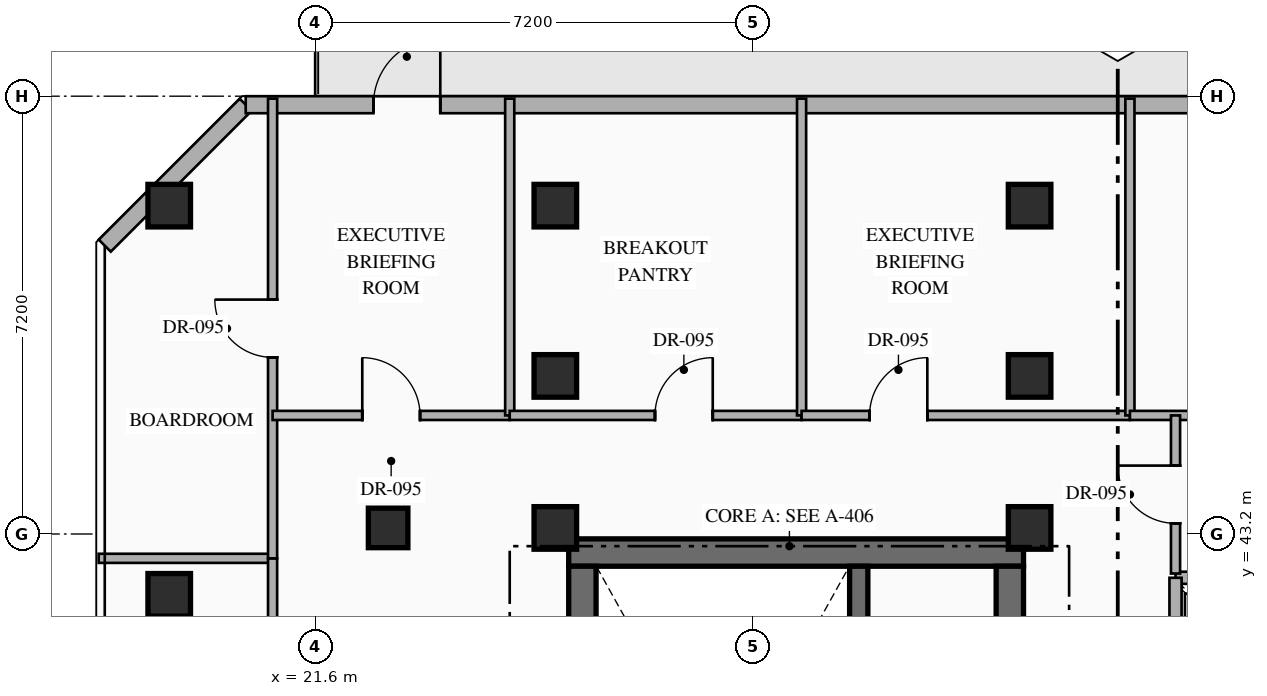
"""IFC4 building model, lengths in metres.
Left out: names, types, materials, properties, quantities, classifications, styles, units other than length and angle.
Written with IfcOpenShell. Run it as: python <this file> out.ifc"""

import sys

from ifc_helpers import new_model, si_unit, direction, frame, frame_2d, origin, origin_2d, place, context, subcontext, project, spatial, rectangle, hollow_rectangle, extrude, element, fill, save


model = new_model("IFC4")
c1 = context("Model", 3, precision=1e-05, world=origin(), true_north=direction((0.0, 1.0)))
c2 = subcontext(c1, "Body", "Model", "MODEL_VIEW")
j1 = project(units=[si_unit("LENGTHUNIT", "METRE"), si_unit("PLANEANGLEUNIT", "RADIAN")], contexts=[c1])
p1 = place(None, origin())
s1 = spatial("IfcSite", under=j1, at=p1, CompositionType="ELEMENT")
p2 = place(p1, origin())
s2 = spatial("IfcBuilding", under=s1, at=p2, CompositionType="ELEMENT")
p3 = place(p2, frame((0.0, 0.0, 223.95)))
s3 = spatial("IfcBuildingStorey", under=s2, at=p3, CompositionType="ELEMENT", Elevation=223.95)
p4 = place(p3, frame((25.77, 42.895, 0.0), z_axis=(0.0, 0.0, 1.0), x_axis=(1.0, 0.0, 0.0)))
e1 = element("IfcWall", 1, at=p4, inside=s3, PredefinedType="SHEAR", context=c2, shape_type="SweptSolid", body=[
    extrude(rectangle(XDim=7.48, YDim=0.45, at=frame_2d((3.74, 0.0))), origin(), (0.0, 0.0, 1.0), 3.6),
])
p5 = place(p3, frame((25.995, 33.19, 0.0), z_axis=(0.0, 0.0, 1.0), x_axis=(0.0, 1.0, 0.0)))
e2 = element("IfcWall", 2, at=p5, inside=s3, PredefinedType="SHEAR", context=c2, shape_type="SweptSolid", body=[
    extrude(rectangle(XDim=9.48, YDim=0.45, at=frame_2d((4.74, 0.0))), origin(), (0.0, 0.0, 1.0), 3.6),
])
p6 = place(p3, frame((33.025, 33.19, 0.0), z_axis=(0.0, 0.0, 1.0), x_axis=(0.0, 1.0, 0.0)))
e3 = element("IfcWall", 3, at=p6, inside=s3, PredefinedType="SHEAR", context=c2, shape_type="SweptSolid", body=[
    extrude(rectangle(XDim=9.48, YDim=0.45, at=frame_2d((4.74, 0.0))), origin(), (0.0, 0.0, 1.0), 3.6),
])
p7 = place(p6, frame((4.16, 0.0, 0.0)))
e4 = element("IfcOpeningElement", 4, at=p7, cuts=e3, PredefinedType="OPENING", context=c2, shape_type="SweptSolid", body=[
    extrude(rectangle(XDim=0.85, YDim=2.08, at=frame_2d((0.425, 1.04))), frame((0.0, 0.235, 0.0), z_axis=(0.0, -1.0, 0.0), x_axis=(1.0, 0.0, 0.0)), (0.0, 0.0, 1.0), 0.47),
])
p8 = place(p6, frame((7.36, 0.0, 0.0)))
e5 = element("IfcOpeningElement", 5, at=p8, cuts=e3, PredefinedType="OPENING", context=c2, shape_type="SweptSolid", body=[
    extrude(rectangle(XDim=0.85, YDim=2.08, at=frame_2d((0.425, 1.04))), frame((0.0, 0.235, 0.0), z_axis=(0.0, -1.0, 0.0), x_axis=(1.0, 0.0, 0.0)), (0.0, 0.0, 1.0), 0.47),
])
p9 = place(p3, frame((30.54, 33.19, 0.0), z_axis=(0.0, 0.0, 1.0), x_axis=(0.0, 1.0, 0.0)))
e6 = element("IfcWall", 6, at=p9, inside=s3, PredefinedType="SHEAR", context=c2, shape_type="SweptSolid", body=[
    extrude(rectangle(XDim=9.48, YDim=0.3, at=frame_2d((4.74, 0.0))), origin(), (0.0, 0.0, 1.0), 3.6),
])
for number, where, z_axis, x_axis in (
    (7, (25.55, 43.3, 0.0), (0.0, 0.0, 1.0), (1.0, 0.0, 0.0)),
    (8, (33.35, 43.3, 0.0), (0.0, 0.0, 1.0), (1.0, 0.0, 0.0)),
    (9, (25.55, 45.8, 0.0), (0.0, 0.0, 1.0), (1.0, 0.0, 0.0)),
    (10, (33.35, 45.8, 0.0), (0.0, 0.0, 1.0), (1.0, 0.0, 0.0)),
    (11, (19.2, 48.6, 0.0), (0.0, 0.0, 1.0), (1.0, 0.0, 0.0)),
    (12, (25.55, 48.6, 0.0), (0.0, 0.0, 1.0), (1.0, 0.0, 0.0)),
    (13, (33.35, 48.6, 0.0), (0.0, 0.0, 1.0), (1.0, 0.0, 0.0)),
    (14, (19.2, 42.2, 0.0), (0.0, 0.0, 1.0), (1.0, 0.0, 0.0)),
):
    element("IfcColumn", number, at=place(p3, frame(where, z_axis=z_axis, x_axis=x_axis)), inside=s3, PredefinedType="COLUMN", context=c2, shape_type="SweptSolid", body=[
        extrude(hollow_rectangle(XDim=0.7, YDim=0.7, WallThickness=0.028, at=origin_2d()), origin(), (0.0, 0.0, 1.0), 3.6),
    ])
p10 = place(p3, frame((22.8, 43.3, 0.0), z_axis=(0.0, 0.0, 1.0), x_axis=(1.0, 0.0, 0.0)))
e15 = element("IfcColumn", 15, at=p10, inside=s3, PredefinedType="COLUMN", context=c2, shape_type="SweptSolid", body=[
    extrude(hollow_rectangle(XDim=0.65, YDim=0.65, WallThickness=0.025, at=origin_2d()), origin(), (0.0, 0.0, 1.0), 3.6),
])
p11 = place(p3, frame((18.14, 47.942, 0.0), z_axis=(0.0, 0.0, 1.0), x_axis=(0.707106781187, 0.707106781187, 0.0)))
e16 = element("IfcWall", 16, at=p11, inside=s3, PredefinedType="STANDARD", context=c2, shape_type="SweptSolid", body=[
    extrude(rectangle(XDim=3.278, YDim=0.28, at=frame_2d((1.639, 0.0))), origin(), (0.0, 0.0, 1.0), 3.35),
])
p12 = place(p3, frame((20.458, 50.26, 0.0), z_axis=(0.0, 0.0, 1.0), x_axis=(1.0, 0.0, 0.0)))
e17 = element("IfcWall", 17, at=p12, inside=s3, PredefinedType="STANDARD", context=c2, shape_type="SweptSolid", body=[
    extrude(rectangle(XDim=22.084, YDim=0.28, at=frame_2d((11.042, 0.0))), origin(), (0.0, 0.0, 1.0), 3.35),
])
p13 = place(p12, frame((2.1, 0.0, 0.0)))
e18 = element("IfcOpeningElement", 18, at=p13, cuts=e17, PredefinedType="OPENING", context=c2, shape_type="SweptSolid", body=[
    extrude(rectangle(XDim=1.1, YDim=2.2, at=frame_2d((0.55, 1.1))), frame((0.0, 0.15, 0.0), z_axis=(0.0, -1.0, 0.0), x_axis=(1.0, 0.0, 0.0)), (0.0, 0.0, 1.0), 0.3),
])
p14 = place(p12, frame((16.326, 0.0, 0.85)))
e19 = element("IfcOpeningElement", 19, at=p14, cuts=e17, PredefinedType="OPENING", context=c2, shape_type="SweptSolid", body=[
    extrude(rectangle(XDim=1.8, YDim=2.1, at=frame_2d((0.9, 1.05))), frame((0.0, 0.15, 0.0), z_axis=(0.0, -1.0, 0.0), x_axis=(1.0, 0.0, 0.0)), (0.0, 0.0, 1.0), 0.3),
])
p15 = place(p3, frame((35.75, 42.48, 0.0), z_axis=(0.0, 0.0, 1.0), x_axis=(1.0, 0.0, 0.0)))
e20 = element("IfcWall", 20, at=p15, inside=s3, PredefinedType="STANDARD", context=c2, shape_type="SweptSolid", body=[
    extrude(rectangle(XDim=9.11, YDim=0.2, at=frame_2d((4.555, 0.0))), origin(), (0.0, 0.0, 1.0), 3.35),
])
p16 = place(p3, frame((35.75, 40.32, 0.0), z_axis=(0.0, 0.0, 1.0), x_axis=(0.0, 1.0, 0.0)))
e21 = element("IfcWall", 21, at=p16, inside=s3, PredefinedType="STANDARD", context=c2, shape_type="SweptSolid", body=[
    extrude(rectangle(XDim=2.16, YDim=0.2, at=frame_2d((1.08, 0.0))), origin(), (0.0, 0.0, 1.0), 3.35),
])
p17 = place(p3, frame((18.04, 42.8, 0.0), z_axis=(0.0, 0.0, 1.0), x_axis=(1.0, 0.0, 0.0)))
e22 = element("IfcWall", 22, at=p17, inside=s3, PredefinedType="PARTITIONING", context=c2, shape_type="SweptSolid", body=[
    extrude(rectangle(XDim=2.86, YDim=0.15, at=frame_2d((1.43, 0.0))), origin(), (0.0, 0.0, 1.0), 3.35),
])
p18 = place(p3, frame((20.9, 36.6, 0.0), z_axis=(0.0, 0.0, 1.0), x_axis=(0.0, 1.0, 0.0)))
e23 = element("IfcWall", 23, at=p18, inside=s3, PredefinedType="PARTITIONING", context=c2, shape_type="SweptSolid", body=[
    extrude(rectangle(XDim=6.2, YDim=0.15, at=frame_2d((3.1, 0.0))), origin(), (0.0, 0.0, 1.0), 3.35),
])
p19 = place(p18, frame((4.196, 0.0, 0.0)))
e24 = element("IfcOpeningElement", 24, at=p19, cuts=e23, PredefinedType="OPENING", context=c2, shape_type="SweptSolid", body=[
    extrude(rectangle(XDim=0.95, YDim=2.15, at=frame_2d((0.475, 1.075))), frame((0.0, 0.085, 0.0), z_axis=(0.0, -1.0, 0.0), x_axis=(1.0, 0.0, 0.0)), (0.0, 0.0, 1.0), 0.17),
])
p20 = place(p3, frame((20.9, 42.8, 0.0), z_axis=(0.0, 0.0, 1.0), x_axis=(0.0, 1.0, 0.0)))
e25 = element("IfcWall", 25, at=p20, inside=s3, PredefinedType="PARTITIONING", context=c2, shape_type="SweptSolid", body=[
    extrude(rectangle(XDim=7.56, YDim=0.15, at=frame_2d((3.78, 0.0))), origin(), (0.0, 0.0, 1.0), 3.35),
])
p21 = place(p20, frame((3.305, 0.0, 0.0)))
e26 = element("IfcOpeningElement", 26, at=p21, cuts=e25, PredefinedType="OPENING", context=c2, shape_type="SweptSolid", body=[
    extrude(rectangle(XDim=0.95, YDim=2.15, at=frame_2d((0.475, 1.075))), frame((0.0, 0.085, 0.0), z_axis=(0.0, -1.0, 0.0), x_axis=(1.0, 0.0, 0.0)), (0.0, 0.0, 1.0), 0.17),
])
p22 = place(p3, frame((20.9, 45.15, 0.0), z_axis=(0.0, 0.0, 1.0), x_axis=(1.0, 0.0, 0.0)))
e27 = element("IfcWall", 27, at=p22, inside=s3, PredefinedType="PARTITIONING", context=c2, shape_type="SweptSolid", body=[
    extrude(rectangle(XDim=3.9, YDim=0.15, at=frame_2d((1.95, 0.0))), origin(), (0.0, 0.0, 1.0), 3.35),
])
p23 = place(p22, frame((1.475, 0.0, 0.0)))
e28 = element("IfcOpeningElement", 28, at=p23, cuts=e27, PredefinedType="OPENING", context=c2, shape_type="SweptSolid", body=[
    extrude(rectangle(XDim=0.95, YDim=2.15, at=frame_2d((0.475, 1.075))), frame((0.0, 0.085, 0.0), z_axis=(0.0, -1.0, 0.0), x_axis=(1.0, 0.0, 0.0)), (0.0, 0.0, 1.0), 0.17),
])
p24 = place(p3, frame((24.8, 45.15, 0.0), z_axis=(0.0, 0.0, 1.0), x_axis=(0.0, 1.0, 0.0)))
e29 = element("IfcWall", 29, at=p24, inside=s3, PredefinedType="PARTITIONING", context=c2, shape_type="SweptSolid", body=[
    extrude(rectangle(XDim=5.21, YDim=0.15, at=frame_2d((2.605, 0.0))), origin(), (0.0, 0.0, 1.0), 3.35),
])
p25 = place(p3, frame((24.8, 45.15, 0.0), z_axis=(0.0, 0.0, 1.0), x_axis=(1.0, 0.0, 0.0)))
e30 = element("IfcWall", 30, at=p25, inside=s3, PredefinedType="PARTITIONING", context=c2, shape_type="SweptSolid", body=[
    extrude(rectangle(XDim=4.8, YDim=0.15, at=frame_2d((2.4, 0.0))), origin(), (0.0, 0.0, 1.0), 3.35),
])
p26 = place(p25, frame((2.389, 0.0, 0.0)))
e31 = element("IfcOpeningElement", 31, at=p26, cuts=e30, PredefinedType="OPENING", context=c2, shape_type="SweptSolid", body=[
    extrude(rectangle(XDim=0.95, YDim=2.15, at=frame_2d((0.475, 1.075))), frame((0.0, 0.085, 0.0), z_axis=(0.0, -1.0, 0.0), x_axis=(1.0, 0.0, 0.0)), (0.0, 0.0, 1.0), 0.17),
])
p27 = place(p3, frame((29.6, 45.15, 0.0), z_axis=(0.0, 0.0, 1.0), x_axis=(0.0, 1.0, 0.0)))
e32 = element("IfcWall", 32, at=p27, inside=s3, PredefinedType="PARTITIONING", context=c2, shape_type="SweptSolid", body=[
    extrude(rectangle(XDim=5.21, YDim=0.15, at=frame_2d((2.605, 0.0))), origin(), (0.0, 0.0, 1.0), 3.35),
])
p28 = place(p3, frame((29.6, 45.15, 0.0), z_axis=(0.0, 0.0, 1.0), x_axis=(1.0, 0.0, 0.0)))
e33 = element("IfcWall", 33, at=p28, inside=s3, PredefinedType="PARTITIONING", context=c2, shape_type="SweptSolid", body=[
    extrude(rectangle(XDim=5.4, YDim=0.15, at=frame_2d((2.7, 0.0))), origin(), (0.0, 0.0, 1.0), 3.35),
])
p29 = place(p28, frame((1.118, 0.0, 0.0)))
e34 = element("IfcOpeningElement", 34, at=p29, cuts=e33, PredefinedType="OPENING", context=c2, shape_type="SweptSolid", body=[
    extrude(rectangle(XDim=0.95, YDim=2.15, at=frame_2d((0.475, 1.075))), frame((0.0, 0.085, 0.0), z_axis=(0.0, -1.0, 0.0), x_axis=(1.0, 0.0, 0.0)), (0.0, 0.0, 1.0), 0.17),
])
p30 = place(p3, frame((35.0, 45.15, 0.0), z_axis=(0.0, 0.0, 1.0), x_axis=(0.0, 1.0, 0.0)))
e35 = element("IfcWall", 35, at=p30, inside=s3, PredefinedType="PARTITIONING", context=c2, shape_type="SweptSolid", body=[
    extrude(rectangle(XDim=5.21, YDim=0.15, at=frame_2d((2.605, 0.0))), origin(), (0.0, 0.0, 1.0), 3.35),
])
p31 = place(p3, frame((35.0, 45.15, 0.0), z_axis=(0.0, 0.0, 1.0), x_axis=(1.0, 0.0, 0.0)))
e36 = element("IfcWall", 36, at=p31, inside=s3, PredefinedType="PARTITIONING", context=c2, shape_type="SweptSolid", body=[
    extrude(rectangle(XDim=5.2, YDim=0.15, at=frame_2d((2.6, 0.0))), origin(), (0.0, 0.0, 1.0), 3.35),
])
p32 = place(p31, frame((2.125, 0.0, 0.0)))
e37 = element("IfcOpeningElement", 37, at=p32, cuts=e36, PredefinedType="OPENING", context=c2, shape_type="SweptSolid", body=[
    extrude(rectangle(XDim=0.95, YDim=2.15, at=frame_2d((0.475, 1.075))), frame((0.0, 0.085, 0.0), z_axis=(0.0, -1.0, 0.0), x_axis=(1.0, 0.0, 0.0)), (0.0, 0.0, 1.0), 0.17),
])
p33 = place(p3, frame((35.75, 42.55, 0.0), z_axis=(0.0, 0.0, 1.0), x_axis=(0.0, 1.0, 0.0)))
e38 = element("IfcWall", 38, at=p33, inside=s3, PredefinedType="PARTITIONING", context=c2, shape_type="SweptSolid", body=[
    extrude(rectangle(XDim=2.6, YDim=0.15, at=frame_2d((1.3, 0.0))), origin(), (0.0, 0.0, 1.0), 3.35),
])
p34 = place(p33, frame((0.825, 0.0, 0.0)))
e39 = element("IfcOpeningElement", 39, at=p34, cuts=e38, PredefinedType="OPENING", context=c2, shape_type="SweptSolid", body=[
    extrude(rectangle(XDim=0.95, YDim=2.15, at=frame_2d((0.475, 1.075))), frame((0.0, 0.085, 0.0), z_axis=(0.0, -1.0, 0.0), x_axis=(1.0, 0.0, 0.0)), (0.0, 0.0, 1.0), 0.17),
])
p35 = place(p13, origin())
e40 = element("IfcDoor", 40, at=p35, inside=s3, OperationType="SINGLE_SWING_RIGHT", PredefinedType="DOOR", context=c2, shape_type="SweptSolid", body=[
    extrude(rectangle(XDim=1.1, YDim=2.2, at=frame_2d((0.55, 1.1))), frame((0.0, 0.025, 0.0), z_axis=(0.0, -1.0, 0.0), x_axis=(1.0, 0.0, 0.0)), (0.0, 0.0, 1.0), 0.05),
])
fill(e18, e40)
p36 = place(p21, origin())
e41 = element("IfcDoor", 41, at=p36, inside=s3, OperationType="SINGLE_SWING_RIGHT", PredefinedType="DOOR", context=c2, shape_type="SweptSolid", body=[
    extrude(rectangle(XDim=0.95, YDim=2.15, at=frame_2d((0.475, 1.075))), frame((0.0, 0.025, 0.0), z_axis=(0.0, -1.0, 0.0), x_axis=(1.0, 0.0, 0.0)), (0.0, 0.0, 1.0), 0.05),
])
fill(e26, e41)
p37 = place(p23, origin())
e42 = element("IfcDoor", 42, at=p37, inside=s3, OperationType="SINGLE_SWING_LEFT", PredefinedType="DOOR", context=c2, shape_type="SweptSolid", body=[
    extrude(rectangle(XDim=0.95, YDim=2.15, at=frame_2d((0.475, 1.075))), frame((0.0, 0.025, 0.0), z_axis=(0.0, -1.0, 0.0), x_axis=(1.0, 0.0, 0.0)), (0.0, 0.0, 1.0), 0.05),
])
fill(e28, e42)
p38 = place(p26, origin())
e43 = element("IfcDoor", 43, at=p38, inside=s3, OperationType="SINGLE_SWING_RIGHT", PredefinedType="DOOR", context=c2, shape_type="SweptSolid", body=[
    extrude(rectangle(XDim=0.95, YDim=2.15, at=frame_2d((0.475, 1.075))), frame((0.0, 0.025, 0.0), z_axis=(0.0, -1.0, 0.0), x_axis=(1.0, 0.0, 0.0)), (0.0, 0.0, 1.0), 0.05),
])
fill(e31, e43)
p39 = place(p29, origin())
e44 = element("IfcDoor", 44, at=p39, inside=s3, OperationType="SINGLE_SWING_RIGHT", PredefinedType="DOOR", context=c2, shape_type="SweptSolid", body=[
    extrude(rectangle(XDim=0.95, YDim=2.15, at=frame_2d((0.475, 1.075))), frame((0.0, 0.025, 0.0), z_axis=(0.0, -1.0, 0.0), x_axis=(1.0, 0.0, 0.0)), (0.0, 0.0, 1.0), 0.05),
])
fill(e34, e44)
p40 = place(p34, origin())
e45 = element("IfcDoor", 45, at=p40, inside=s3, OperationType="SINGLE_SWING_RIGHT", PredefinedType="DOOR", context=c2, shape_type="SweptSolid", body=[
    extrude(rectangle(XDim=0.95, YDim=2.15, at=frame_2d((0.475, 1.075))), frame((0.0, 0.025, 0.0), z_axis=(0.0, -1.0, 0.0), x_axis=(1.0, 0.0, 0.0)), (0.0, 0.0, 1.0), 0.05),
])
fill(e39, e45)
save(model, sys.argv[1])
